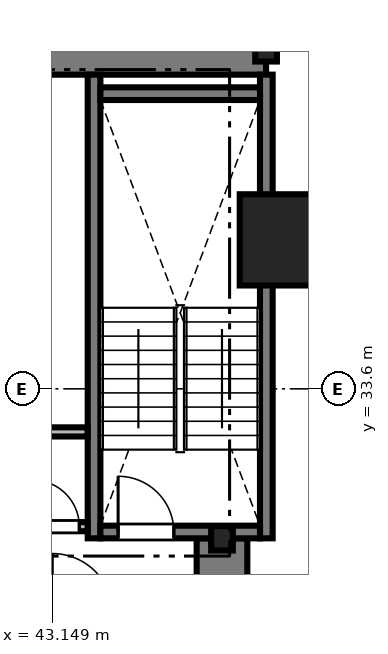
"""IFC4 building model, lengths in metres.
Left out: names, types, materials, properties, quantities, classifications, styles, units other than length and angle.
Written with IfcOpenShell. Run it as: python <this file> out.ifc"""

import sys

from ifc_helpers import new_model, si_unit, direction, frame, frame_2d, origin, origin_2d, place, context, subcontext, project, spatial, rectangle, i_section, extrude, source, transform, mapped, element, fill, save


model = new_model("IFC4")
c1 = context("Model", 3, precision=1e-05, world=origin(), true_north=direction((0.0, 1.0)))
c2 = subcontext(c1, "Body", "Model", "MODEL_VIEW")
j1 = project(units=[si_unit("LENGTHUNIT", "METRE"), si_unit("PLANEANGLEUNIT", "RADIAN")], contexts=[c1])
p1 = place(None, origin())
s1 = spatial("IfcSite", under=j1, at=p1, CompositionType="ELEMENT")
p2 = place(p1, origin())
s2 = spatial("IfcBuilding", under=s1, at=p2, CompositionType="ELEMENT")
p3 = place(p2, frame((0.0, 0.0, 89.65)))
s3 = spatial("IfcBuildingStorey", under=s2, at=p3, CompositionType="ELEMENT", Elevation=89.65)
m1 = source(origin(), c2, "Body", "SweptSolid", [
    extrude(rectangle(XDim=17.52, YDim=1.0, at=frame_2d((8.76, 0.0))), origin(), (0.0, 0.0, 1.0), 3.0),
])
p4 = place(p3, frame((29.85, 40.3, 0.0), z_axis=(0.0, 0.0, 1.0), x_axis=(1.0, 0.0, 0.0)))
e1 = element("IfcWall", 1, at=p4, inside=s3, PredefinedType="SHEAR", context=c2, shape_type="MappedRepresentation", body=[
    mapped(m1, transform((0.0, 0.0, 0.0), scale=1.0)),
])
m2 = source(origin(), c2, "Body", "SweptSolid", [
    extrude(rectangle(XDim=13.15, YDim=1.0, at=frame_2d((6.575, 0.0))), origin(), (0.0, 0.0, 1.0), 3.0),
])
p5 = place(p3, frame((46.5, 17.5, 0.0), z_axis=(0.0, 0.0, 1.0), x_axis=(0.0, 1.0, 0.0)))
e2 = element("IfcWall", 2, at=p5, inside=s3, PredefinedType="SHEAR", context=c2, shape_type="MappedRepresentation", body=[
    mapped(m2, transform((0.0, 0.0, 0.0), scale=1.0)),
])
m3 = source(origin(), c2, "Body", "SweptSolid", [
    extrude(i_section(OverallWidth=0.428, OverallDepth=0.481, WebThickness=0.04, FlangeThickness=0.063, FilletRadius=0.015, at=origin_2d()), origin(), (0.0, 0.0, 1.0), 3.0),
])
for number, where, z_axis, x_axis in (
    (3, (46.5, 30.65, 0.0), (0.0, 0.0, 1.0), (1.0, 0.0, 0.0)),
    (4, (47.37, 40.3, 0.0), (0.0, 0.0, 1.0), (1.0, 0.0, 0.0)),
):
    element("IfcColumn", number, at=place(p3, frame(where, z_axis=z_axis, x_axis=x_axis)), inside=s3, PredefinedType="COLUMN", context=c2, shape_type="MappedRepresentation", body=[
        mapped(m3, transform((0.0, 0.0, 0.0), scale=1.0)),
    ])
m4 = source(origin(), c2, "Body", "SweptSolid", [
    extrude(rectangle(XDim=1.8, YDim=1.8, at=origin_2d()), origin(), (0.0, 0.0, 1.0), 3.0),
])
p6 = place(p3, frame((47.75, 36.54, 0.0), z_axis=(0.0, 0.0, 1.0), x_axis=(1.0, 0.0, 0.0)))
e5 = element("IfcColumn", 5, at=p6, inside=s3, PredefinedType="COLUMN", context=c2, shape_type="MappedRepresentation", body=[
    mapped(m4, transform((0.0, 0.0, 0.0), scale=1.0)),
])
m5 = source(origin(), c2, "Body", "SweptSolid", [
    extrude(rectangle(XDim=9.15, YDim=0.25, at=frame_2d((4.575, 0.0))), origin(), (0.0, 0.0, 1.0), 3.45),
])
for number, where, z_axis, x_axis in (
    (6, (43.975, 30.65, 0.0), (0.0, 0.0, 1.0), (0.0, 1.0, 0.0)),
    (7, (47.375, 30.65, 0.0), (0.0, 0.0, 1.0), (0.0, 1.0, 0.0)),
):
    element("IfcWall", number, at=place(p3, frame(where, z_axis=z_axis, x_axis=x_axis)), inside=s3, PredefinedType="SOLIDWALL", context=c2, shape_type="MappedRepresentation", body=[
        mapped(m5, transform((0.0, 0.0, 0.0), scale=1.0)),
    ])
m6 = source(origin(), c2, "Body", "SweptSolid", [
    extrude(rectangle(XDim=3.15, YDim=0.25, at=frame_2d((1.575, 0.0))), origin(), (0.0, 0.0, 1.0), 3.45),
])
p7 = place(p3, frame((44.1, 39.425, 0.0), z_axis=(0.0, 0.0, 1.0), x_axis=(1.0, 0.0, 0.0)))
e8 = element("IfcWall", 8, at=p7, inside=s3, PredefinedType="SOLIDWALL", context=c2, shape_type="MappedRepresentation", body=[
    mapped(m6, transform((0.0, 0.0, 0.0), scale=1.0)),
])
p8 = place(p3, frame((44.1, 30.775, 0.0), z_axis=(0.0, 0.0, 1.0), x_axis=(1.0, 0.0, 0.0)))
e9 = element("IfcWall", 9, at=p8, inside=s3, PredefinedType="SOLIDWALL", context=c2, shape_type="MappedRepresentation", body=[
    mapped(m6, transform((0.0, 0.0, 0.0), scale=1.0)),
])
m7 = source(origin(), c2, "Body", "SweptSolid", [
    extrude(rectangle(XDim=1.1, YDim=2.2, at=frame_2d((0.55, 1.1))), frame((0.0, 0.135, 0.0), z_axis=(0.0, -1.0, 0.0), x_axis=(1.0, 0.0, 0.0)), (0.0, 0.0, 1.0), 0.27),
])
p9 = place(p8, frame((0.35, 0.0, 0.0)))
e10 = element("IfcOpeningElement", 10, at=p9, cuts=e9, PredefinedType="OPENING", context=c2, shape_type="MappedRepresentation", body=[
    mapped(m7, transform((0.0, 0.0, 0.0), scale=1.0)),
])
m8 = source(origin(), c2, "Body", "SweptSolid", [
    extrude(rectangle(XDim=1.248, YDim=0.18, at=frame_2d((0.624, 0.0))), origin(), (0.0, 0.0, 1.0), 3.0),
])
p10 = place(p3, frame((42.6, 30.88, 0.0), z_axis=(0.0, 0.0, 1.0), x_axis=(1.0, 0.0, 0.0)))
e11 = element("IfcWall", 11, at=p10, inside=s3, PredefinedType="PARTITIONING", context=c2, shape_type="MappedRepresentation", body=[
    mapped(m8, transform((0.0, 0.0, 0.0), scale=1.0)),
])
m9 = source(origin(), c2, "Body", "SweptSolid", [
    extrude(rectangle(XDim=0.92, YDim=2.1, at=frame_2d((0.46, 1.05))), frame((0.0, 0.1, 0.0), z_axis=(0.0, -1.0, 0.0), x_axis=(1.0, 0.0, 0.0)), (0.0, 0.0, 1.0), 0.2),
])
p11 = place(p10, frame((0.164, 0.0, 0.0)))
e12 = element("IfcOpeningElement", 12, at=p11, cuts=e11, PredefinedType="OPENING", context=c2, shape_type="MappedRepresentation", body=[
    mapped(m9, transform((0.0, 0.0, 0.0), scale=1.0)),
])
m10 = source(origin(), c2, "Body", "SweptSolid", [
    extrude(rectangle(XDim=1.348, YDim=0.18, at=frame_2d((0.674, 0.0))), origin(), (0.0, 0.0, 1.0), 3.0),
])
p12 = place(p3, frame((42.5, 32.75, 0.0), z_axis=(0.0, 0.0, 1.0), x_axis=(1.0, 0.0, 0.0)))
e13 = element("IfcWall", 13, at=p12, inside=s3, PredefinedType="PARTITIONING", context=c2, shape_type="MappedRepresentation", body=[
    mapped(m10, transform((0.0, 0.0, 0.0), scale=1.0)),
])
m11 = source(origin(), c2, "Body", "SweptSolid", [
    extrude(rectangle(XDim=1.1, YDim=2.2, at=frame_2d((0.55, 1.1))), frame((0.0, 0.025, 0.0), z_axis=(0.0, -1.0, 0.0), x_axis=(1.0, 0.0, 0.0)), (0.0, 0.0, 1.0), 0.05),
])
p13 = place(p9, origin())
e14 = element("IfcDoor", 14, at=p13, inside=s3, OperationType="SINGLE_SWING_LEFT", PredefinedType="DOOR", context=c2, shape_type="MappedRepresentation", body=[
    mapped(m11, transform((0.0, 0.0, 0.0), scale=1.0)),
])
fill(e10, e14)
m12 = source(origin(), c2, "Body", "SweptSolid", [
    extrude(rectangle(XDim=0.92, YDim=2.1, at=frame_2d((0.46, 1.05))), frame((0.0, 0.025, 0.0), z_axis=(0.0, -1.0, 0.0), x_axis=(1.0, 0.0, 0.0)), (0.0, 0.0, 1.0), 0.05),
])
p14 = place(p11, origin())
e15 = element("IfcDoor", 15, at=p14, inside=s3, OperationType="SINGLE_SWING_LEFT", PredefinedType="DOOR", context=c2, shape_type="MappedRepresentation", body=[
    mapped(m12, transform((0.0, 0.0, 0.0), scale=1.0)),
])
fill(e12, e15)
save(model, sys.argv[1])
